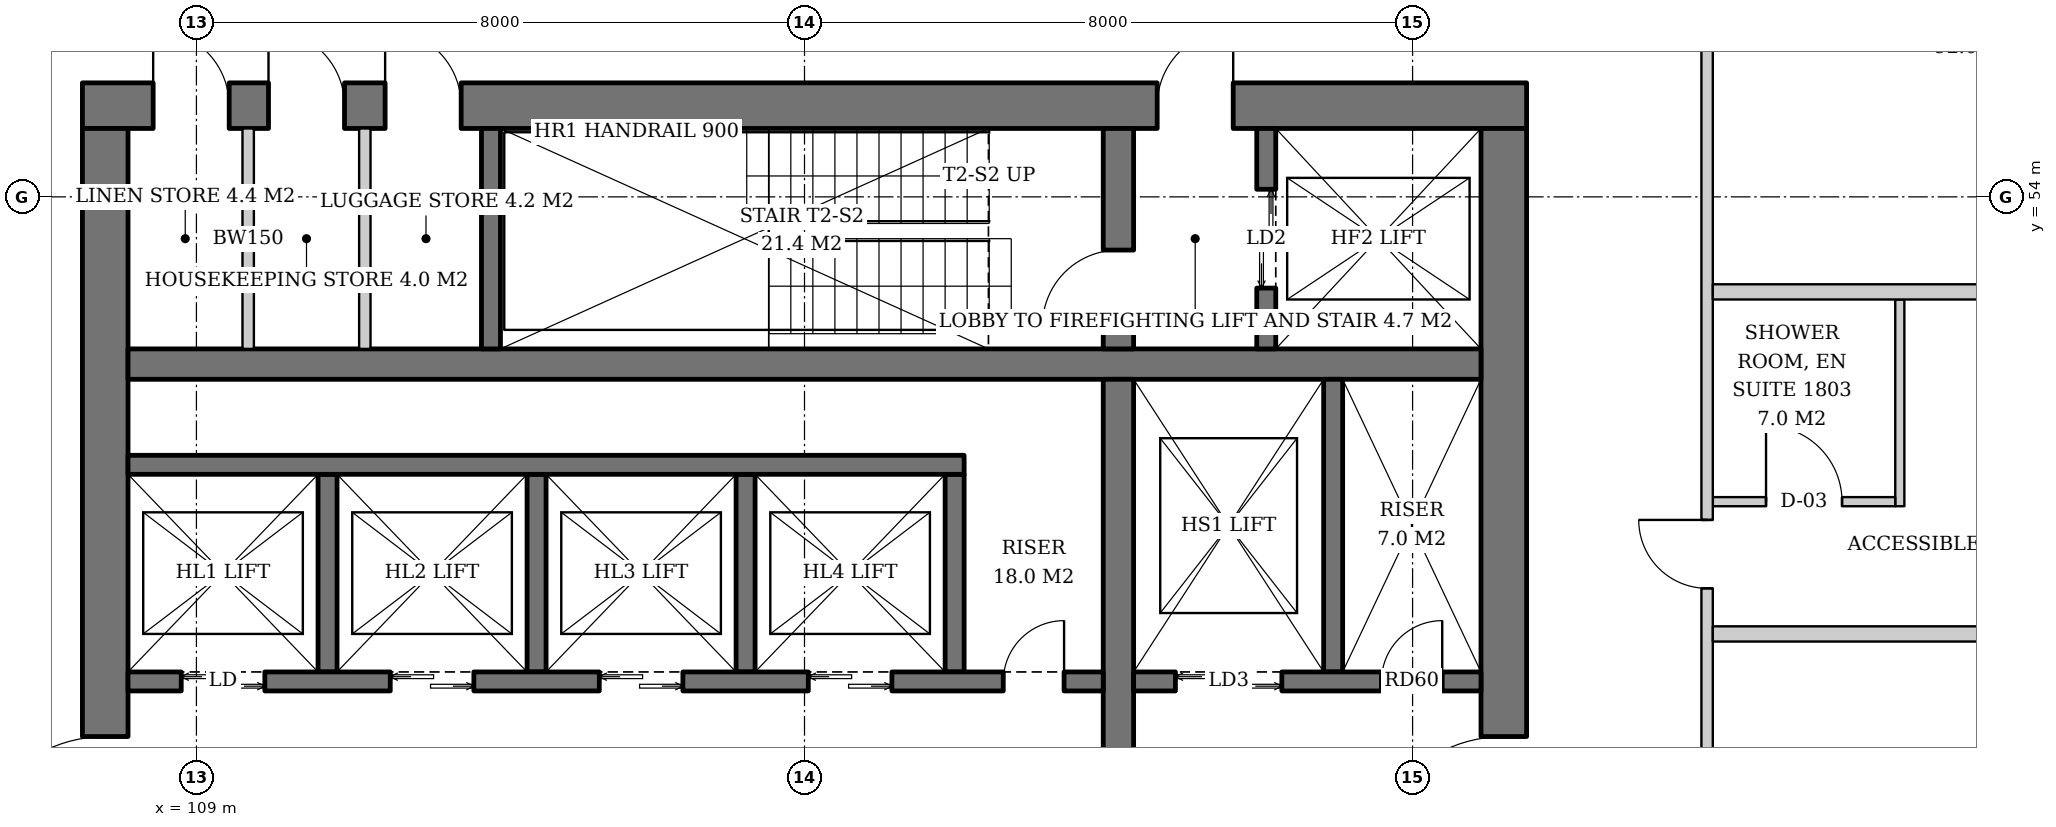
"""IFC4 building model, lengths in metres.
Left out: names, types, materials, properties, quantities, classifications, styles, units other than length and angle.
Written with IfcOpenShell. Run it as: python <this file> out.ifc"""

import sys

from ifc_helpers import new_model, si_unit, direction, frame, frame_2d, origin, place, context, subcontext, project, spatial, rectangle, extrude, element, fill, save


model = new_model("IFC4")
c1 = context("Model", 3, precision=1e-05, world=origin(), true_north=direction((0.0, 1.0)))
c2 = subcontext(c1, "Body", "Model", "MODEL_VIEW")
j1 = project(units=[si_unit("LENGTHUNIT", "METRE"), si_unit("PLANEANGLEUNIT", "RADIAN")], contexts=[c1])
p1 = place(None, origin())
s1 = spatial("IfcSite", under=j1, at=p1, CompositionType="ELEMENT")
p2 = place(p1, origin())
s2 = spatial("IfcBuilding", under=s1, at=p2, CompositionType="ELEMENT")
p3 = place(p2, frame((0.0, 0.0, 74.2)))
s3 = spatial("IfcBuildingStorey", under=s2, at=p3, CompositionType="ELEMENT", Elevation=74.2)
p4 = place(p3, frame((107.5, 55.2, 0.0), z_axis=(0.0, 0.0, 1.0), x_axis=(1.0, 0.0, 0.0)))
e1 = element("IfcWall", 1, at=p4, inside=s3, PredefinedType="SHEAR", context=c2, shape_type="SweptSolid", body=[
    extrude(rectangle(XDim=19.0, YDim=0.6, at=frame_2d((9.5, 0.0))), origin(), (0.0, 0.0, 1.0), 3.8),
])
p5 = place(p4, frame((14.14, 0.0, 0.0)))
e2 = element("IfcOpeningElement", 2, at=p5, cuts=e1, PredefinedType="OPENING", context=c2, shape_type="SweptSolid", body=[
    extrude(rectangle(XDim=1.0, YDim=2.1, at=frame_2d((0.5, 1.05))), frame((0.0, 0.31, 0.0), z_axis=(0.0, -1.0, 0.0), x_axis=(1.0, 0.0, 0.0)), (0.0, 0.0, 1.0), 0.62),
])
p6 = place(p4, frame((0.931, 0.0, 0.0)))
e3 = element("IfcOpeningElement", 3, at=p6, cuts=e1, PredefinedType="OPENING", context=c2, shape_type="SweptSolid", body=[
    extrude(rectangle(XDim=1.0, YDim=2.1, at=frame_2d((0.5, 1.05))), frame((0.0, 0.31, 0.0), z_axis=(0.0, -1.0, 0.0), x_axis=(1.0, 0.0, 0.0)), (0.0, 0.0, 1.0), 0.62),
])
p7 = place(p4, frame((2.448, 0.0, 0.0)))
e4 = element("IfcOpeningElement", 4, at=p7, cuts=e1, PredefinedType="OPENING", context=c2, shape_type="SweptSolid", body=[
    extrude(rectangle(XDim=1.0, YDim=2.1, at=frame_2d((0.5, 1.05))), frame((0.0, 0.31, 0.0), z_axis=(0.0, -1.0, 0.0), x_axis=(1.0, 0.0, 0.0)), (0.0, 0.0, 1.0), 0.62),
])
p8 = place(p4, frame((3.983, 0.0, 0.0)))
e5 = element("IfcOpeningElement", 5, at=p8, cuts=e1, PredefinedType="OPENING", context=c2, shape_type="SweptSolid", body=[
    extrude(rectangle(XDim=1.0, YDim=2.1, at=frame_2d((0.5, 1.05))), frame((0.0, 0.31, 0.0), z_axis=(0.0, -1.0, 0.0), x_axis=(1.0, 0.0, 0.0)), (0.0, 0.0, 1.0), 0.62),
])
p9 = place(p3, frame((107.8, 37.1, 0.0), z_axis=(0.0, 0.0, 1.0), x_axis=(0.0, 1.0, 0.0)))
e6 = element("IfcWall", 6, at=p9, inside=s3, PredefinedType="SHEAR", context=c2, shape_type="SweptSolid", body=[
    extrude(rectangle(XDim=17.8, YDim=0.6, at=frame_2d((8.9, 0.0))), origin(), (0.0, 0.0, 1.0), 3.8),
])
p10 = place(p9, frame((8.0, 0.0, 0.0)))
e7 = element("IfcOpeningElement", 7, at=p10, cuts=e6, PredefinedType="OPENING", context=c2, shape_type="SweptSolid", body=[
    extrude(rectangle(XDim=1.8, YDim=2.4, at=frame_2d((0.9, 1.2))), frame((0.0, 0.31, 0.0), z_axis=(0.0, -1.0, 0.0), x_axis=(1.0, 0.0, 0.0)), (0.0, 0.0, 1.0), 0.62),
])
p11 = place(p3, frame((126.2, 37.1, 0.0), z_axis=(0.0, 0.0, 1.0), x_axis=(0.0, 1.0, 0.0)))
e8 = element("IfcWall", 8, at=p11, inside=s3, PredefinedType="SHEAR", context=c2, shape_type="SweptSolid", body=[
    extrude(rectangle(XDim=17.8, YDim=0.6, at=frame_2d((8.9, 0.0))), origin(), (0.0, 0.0, 1.0), 3.8),
])
p12 = place(p11, frame((8.0, 0.0, 0.0)))
e9 = element("IfcOpeningElement", 9, at=p12, cuts=e8, PredefinedType="OPENING", context=c2, shape_type="SweptSolid", body=[
    extrude(rectangle(XDim=1.8, YDim=2.4, at=frame_2d((0.9, 1.2))), frame((0.0, 0.31, 0.0), z_axis=(0.0, -1.0, 0.0), x_axis=(1.0, 0.0, 0.0)), (0.0, 0.0, 1.0), 0.62),
])
p13 = place(p3, frame((108.1, 51.8, 0.0), z_axis=(0.0, 0.0, 1.0), x_axis=(1.0, 0.0, 0.0)))
e10 = element("IfcWall", 10, at=p13, inside=s3, PredefinedType="SHEAR", context=c2, shape_type="SweptSolid", body=[
    extrude(rectangle(XDim=17.8, YDim=0.4, at=frame_2d((8.9, 0.0))), origin(), (0.0, 0.0, 1.0), 3.8),
])
p14 = place(p3, frame((121.13, 40.4, 0.0), z_axis=(0.0, 0.0, 1.0), x_axis=(0.0, 1.0, 0.0)))
e11 = element("IfcWall", 11, at=p14, inside=s3, PredefinedType="SHEAR", context=c2, shape_type="SweptSolid", body=[
    extrude(rectangle(XDim=11.2, YDim=0.4, at=frame_2d((5.6, 0.0))), origin(), (0.0, 0.0, 1.0), 3.8),
])
p15 = place(p3, frame((121.13, 52.0, 0.0), z_axis=(0.0, 0.0, 1.0), x_axis=(0.0, 1.0, 0.0)))
e12 = element("IfcWall", 12, at=p15, inside=s3, PredefinedType="SHEAR", context=c2, shape_type="SweptSolid", body=[
    extrude(rectangle(XDim=2.9, YDim=0.4, at=frame_2d((1.45, 0.0))), origin(), (0.0, 0.0, 1.0), 3.8),
])
p16 = place(p15, frame((0.3, 0.0, 0.0)))
e13 = element("IfcOpeningElement", 13, at=p16, cuts=e12, PredefinedType="OPENING", context=c2, shape_type="SweptSolid", body=[
    extrude(rectangle(XDim=1.0, YDim=2.1, at=frame_2d((0.5, 1.05))), frame((0.0, 0.21, 0.0), z_axis=(0.0, -1.0, 0.0), x_axis=(1.0, 0.0, 0.0)), (0.0, 0.0, 1.0), 0.42),
])
p17 = place(p3, frame((112.875, 52.0, 0.0), z_axis=(0.0, 0.0, 1.0), x_axis=(0.0, 1.0, 0.0)))
e14 = element("IfcWall", 14, at=p17, inside=s3, PredefinedType="SHEAR", context=c2, shape_type="SweptSolid", body=[
    extrude(rectangle(XDim=2.9, YDim=0.25, at=frame_2d((1.45, 0.0))), origin(), (0.0, 0.0, 1.0), 3.8),
])
p18 = place(p3, frame((123.075, 52.0, 0.0), z_axis=(0.0, 0.0, 1.0), x_axis=(0.0, 1.0, 0.0)))
e15 = element("IfcWall", 15, at=p18, inside=s3, PredefinedType="SHEAR", context=c2, shape_type="SweptSolid", body=[
    extrude(rectangle(XDim=2.9, YDim=0.25, at=frame_2d((1.45, 0.0))), origin(), (0.0, 0.0, 1.0), 3.8),
])
p19 = place(p18, frame((0.8, 0.0, 0.0)))
e16 = element("IfcOpeningElement", 16, at=p19, cuts=e15, PredefinedType="OPENING", context=c2, shape_type="SweptSolid", body=[
    extrude(rectangle(XDim=1.3, YDim=2.2, at=frame_2d((0.65, 1.1))), frame((0.0, 0.135, 0.0), z_axis=(0.0, -1.0, 0.0), x_axis=(1.0, 0.0, 0.0)), (0.0, 0.0, 1.0), 0.27),
])
for number, where, z_axis, x_axis in (
    (17, (110.725, 47.75, 0.0), (0.0, 0.0, 1.0), (0.0, 1.0, 0.0)),
    (18, (113.475, 47.75, 0.0), (0.0, 0.0, 1.0), (0.0, 1.0, 0.0)),
    (19, (116.225, 47.75, 0.0), (0.0, 0.0, 1.0), (0.0, 1.0, 0.0)),
    (20, (118.975, 47.75, 0.0), (0.0, 0.0, 1.0), (0.0, 1.0, 0.0)),
):
    element("IfcWall", number, at=place(p3, frame(where, z_axis=z_axis, x_axis=x_axis)), inside=s3, PredefinedType="SHEAR", context=c2, shape_type="SweptSolid", body=[
        extrude(rectangle(XDim=2.6, YDim=0.25, at=frame_2d((1.3, 0.0))), origin(), (0.0, 0.0, 1.0), 3.8),
    ])
p20 = place(p3, frame((108.1, 50.475, 0.0), z_axis=(0.0, 0.0, 1.0), x_axis=(1.0, 0.0, 0.0)))
e21 = element("IfcWall", 21, at=p20, inside=s3, PredefinedType="SHEAR", context=c2, shape_type="SweptSolid", body=[
    extrude(rectangle(XDim=11.0, YDim=0.25, at=frame_2d((5.5, 0.0))), origin(), (0.0, 0.0, 1.0), 3.8),
])
p21 = place(p3, frame((108.1, 47.625, 0.0), z_axis=(0.0, 0.0, 1.0), x_axis=(1.0, 0.0, 0.0)))
e22 = element("IfcWall", 22, at=p21, inside=s3, PredefinedType="SHEAR", context=c2, shape_type="SweptSolid", body=[
    extrude(rectangle(XDim=12.83, YDim=0.25, at=frame_2d((6.415, 0.0))), origin(), (0.0, 0.0, 1.0), 3.8),
])
p22 = place(p21, frame((0.7, 0.0, 0.0)))
e23 = element("IfcOpeningElement", 23, at=p22, cuts=e22, PredefinedType="OPENING", context=c2, shape_type="SweptSolid", body=[
    extrude(rectangle(XDim=1.1, YDim=2.2, at=frame_2d((0.55, 1.1))), frame((0.0, 0.135, 0.0), z_axis=(0.0, -1.0, 0.0), x_axis=(1.0, 0.0, 0.0)), (0.0, 0.0, 1.0), 0.27),
])
p23 = place(p21, frame((3.45, 0.0, 0.0)))
e24 = element("IfcOpeningElement", 24, at=p23, cuts=e22, PredefinedType="OPENING", context=c2, shape_type="SweptSolid", body=[
    extrude(rectangle(XDim=1.1, YDim=2.2, at=frame_2d((0.55, 1.1))), frame((0.0, 0.135, 0.0), z_axis=(0.0, -1.0, 0.0), x_axis=(1.0, 0.0, 0.0)), (0.0, 0.0, 1.0), 0.27),
])
p24 = place(p21, frame((6.2, 0.0, 0.0)))
e25 = element("IfcOpeningElement", 25, at=p24, cuts=e22, PredefinedType="OPENING", context=c2, shape_type="SweptSolid", body=[
    extrude(rectangle(XDim=1.1, YDim=2.2, at=frame_2d((0.55, 1.1))), frame((0.0, 0.135, 0.0), z_axis=(0.0, -1.0, 0.0), x_axis=(1.0, 0.0, 0.0)), (0.0, 0.0, 1.0), 0.27),
])
p25 = place(p21, frame((8.95, 0.0, 0.0)))
e26 = element("IfcOpeningElement", 26, at=p25, cuts=e22, PredefinedType="OPENING", context=c2, shape_type="SweptSolid", body=[
    extrude(rectangle(XDim=1.1, YDim=2.2, at=frame_2d((0.55, 1.1))), frame((0.0, 0.135, 0.0), z_axis=(0.0, -1.0, 0.0), x_axis=(1.0, 0.0, 0.0)), (0.0, 0.0, 1.0), 0.27),
])
p26 = place(p21, frame((11.515, 0.0, 0.0)))
e27 = element("IfcOpeningElement", 27, at=p26, cuts=e22, PredefinedType="OPENING", context=c2, shape_type="SweptSolid", body=[
    extrude(rectangle(XDim=0.8, YDim=2.0, at=frame_2d((0.4, 1.0))), frame((0.0, 0.135, 0.0), z_axis=(0.0, -1.0, 0.0), x_axis=(1.0, 0.0, 0.0)), (0.0, 0.0, 1.0), 0.27),
])
p27 = place(p3, frame((123.955, 47.75, 0.0), z_axis=(0.0, 0.0, 1.0), x_axis=(0.0, 1.0, 0.0)))
e28 = element("IfcWall", 28, at=p27, inside=s3, PredefinedType="SHEAR", context=c2, shape_type="SweptSolid", body=[
    extrude(rectangle(XDim=3.85, YDim=0.25, at=frame_2d((1.925, 0.0))), origin(), (0.0, 0.0, 1.0), 3.8),
])
p28 = place(p3, frame((121.33, 47.625, 0.0), z_axis=(0.0, 0.0, 1.0), x_axis=(1.0, 0.0, 0.0)))
e29 = element("IfcWall", 29, at=p28, inside=s3, PredefinedType="SHEAR", context=c2, shape_type="SweptSolid", body=[
    extrude(rectangle(XDim=4.57, YDim=0.25, at=frame_2d((2.285, 0.0))), origin(), (0.0, 0.0, 1.0), 3.8),
])
p29 = place(p28, frame((0.55, 0.0, 0.0)))
e30 = element("IfcOpeningElement", 30, at=p29, cuts=e29, PredefinedType="OPENING", context=c2, shape_type="SweptSolid", body=[
    extrude(rectangle(XDim=1.4, YDim=2.4, at=frame_2d((0.7, 1.2))), frame((0.0, 0.135, 0.0), z_axis=(0.0, -1.0, 0.0), x_axis=(1.0, 0.0, 0.0)), (0.0, 0.0, 1.0), 0.27),
])
p30 = place(p28, frame((3.26, 0.0, 0.0)))
e31 = element("IfcOpeningElement", 31, at=p30, cuts=e29, PredefinedType="OPENING", context=c2, shape_type="SweptSolid", body=[
    extrude(rectangle(XDim=0.8, YDim=2.0, at=frame_2d((0.4, 1.0))), frame((0.0, 0.135, 0.0), z_axis=(0.0, -1.0, 0.0), x_axis=(1.0, 0.0, 0.0)), (0.0, 0.0, 1.0), 0.27),
])
for number, where, z_axis, x_axis in (
    (32, (109.681, 52.0, 0.0), (0.0, 0.0, 1.0), (0.0, 1.0, 0.0)),
    (33, (111.216, 52.0, 0.0), (0.0, 0.0, 1.0), (0.0, 1.0, 0.0)),
):
    element("IfcWall", number, at=place(p3, frame(where, z_axis=z_axis, x_axis=x_axis)), inside=s3, PredefinedType="SOLIDWALL", context=c2, shape_type="SweptSolid", body=[
        extrude(rectangle(XDim=2.9, YDim=0.15, at=frame_2d((1.45, 0.0))), origin(), (0.0, 0.0, 1.0), 3.6),
    ])
p31 = place(p3, frame((131.41, 49.93, 0.0), z_axis=(0.0, 0.0, 1.0), x_axis=(0.0, 1.0, 0.0)))
e34 = element("IfcWall", 34, at=p31, inside=s3, PredefinedType="PARTITIONING", context=c2, shape_type="SweptSolid", body=[
    extrude(rectangle(XDim=2.72, YDim=0.12, at=frame_2d((1.36, 0.0))), origin(), (0.0, 0.0, 1.0), 3.6),
])
p32 = place(p3, frame((128.95, 49.99, 0.0), z_axis=(0.0, 0.0, 1.0), x_axis=(1.0, 0.0, 0.0)))
e35 = element("IfcWall", 35, at=p32, inside=s3, PredefinedType="PARTITIONING", context=c2, shape_type="SweptSolid", body=[
    extrude(rectangle(XDim=2.4, YDim=0.12, at=frame_2d((1.2, 0.0))), origin(), (0.0, 0.0, 1.0), 3.6),
])
p33 = place(p32, frame((0.7, 0.0, 0.0)))
e36 = element("IfcOpeningElement", 36, at=p33, cuts=e35, PredefinedType="OPENING", context=c2, shape_type="SweptSolid", body=[
    extrude(rectangle(XDim=1.0, YDim=2.1, at=frame_2d((0.5, 1.05))), frame((0.0, 0.07, 0.0), z_axis=(0.0, -1.0, 0.0), x_axis=(1.0, 0.0, 0.0)), (0.0, 0.0, 1.0), 0.14),
])
p34 = place(p3, frame((128.875, 34.05, 0.0), z_axis=(0.0, 0.0, 1.0), x_axis=(0.0, 1.0, 0.0)))
e37 = element("IfcWall", 37, at=p34, inside=s3, PredefinedType="PARTITIONING", context=c2, shape_type="SweptSolid", body=[
    extrude(rectangle(XDim=23.75, YDim=0.15, at=frame_2d((11.875, 0.0))), origin(), (0.0, 0.0, 1.0), 2.8),
])
p35 = place(p34, frame((2.175, 0.0, 0.0)))
e38 = element("IfcOpeningElement", 38, at=p35, cuts=e37, PredefinedType="OPENING", context=c2, shape_type="SweptSolid", body=[
    extrude(rectangle(XDim=0.9, YDim=2.1, at=frame_2d((0.45, 1.05))), frame((0.0, 0.085, 0.0), z_axis=(0.0, -1.0, 0.0), x_axis=(1.0, 0.0, 0.0)), (0.0, 0.0, 1.0), 0.17),
])
p36 = place(p34, frame((7.95, 0.0, 0.0)))
e39 = element("IfcOpeningElement", 39, at=p36, cuts=e37, PredefinedType="OPENING", context=c2, shape_type="SweptSolid", body=[
    extrude(rectangle(XDim=0.9, YDim=2.1, at=frame_2d((0.45, 1.05))), frame((0.0, 0.085, 0.0), z_axis=(0.0, -1.0, 0.0), x_axis=(1.0, 0.0, 0.0)), (0.0, 0.0, 1.0), 0.17),
])
p37 = place(p34, frame((14.8, 0.0, 0.0)))
e40 = element("IfcOpeningElement", 40, at=p37, cuts=e37, PredefinedType="OPENING", context=c2, shape_type="SweptSolid", body=[
    extrude(rectangle(XDim=0.9, YDim=2.1, at=frame_2d((0.45, 1.05))), frame((0.0, 0.085, 0.0), z_axis=(0.0, -1.0, 0.0), x_axis=(1.0, 0.0, 0.0)), (0.0, 0.0, 1.0), 0.17),
])
p38 = place(p3, frame((128.95, 48.25, 0.0), z_axis=(0.0, 0.0, 1.0), x_axis=(1.0, 0.0, 0.0)))
e41 = element("IfcWall", 41, at=p38, inside=s3, PredefinedType="PARTITIONING", context=c2, shape_type="SweptSolid", body=[
    extrude(rectangle(XDim=6.84, YDim=0.2, at=frame_2d((3.42, 0.0))), origin(), (0.0, 0.0, 1.0), 3.05),
])
p39 = place(p3, frame((128.95, 52.75, 0.0), z_axis=(0.0, 0.0, 1.0), x_axis=(1.0, 0.0, 0.0)))
e42 = element("IfcWall", 42, at=p39, inside=s3, PredefinedType="PARTITIONING", context=c2, shape_type="SweptSolid", body=[
    extrude(rectangle(XDim=4.187, YDim=0.2, at=frame_2d((2.093, 0.0))), origin(), (0.0, 0.0, 1.0), 3.6),
])
p40 = place(p19, origin())
e43 = element("IfcDoor", 43, at=p40, inside=s3, OperationType="DOUBLE_DOOR_SLIDING", PredefinedType="DOOR", context=c2, shape_type="SweptSolid", body=[
    extrude(rectangle(XDim=1.3, YDim=2.2, at=frame_2d((0.65, 1.1))), frame((0.0, 0.025, 0.0), z_axis=(0.0, -1.0, 0.0), x_axis=(1.0, 0.0, 0.0)), (0.0, 0.0, 1.0), 0.05),
])
fill(e16, e43)
p41 = place(p22, origin())
e44 = element("IfcDoor", 44, at=p41, inside=s3, OperationType="DOUBLE_DOOR_SLIDING", PredefinedType="DOOR", context=c2, shape_type="SweptSolid", body=[
    extrude(rectangle(XDim=1.1, YDim=2.2, at=frame_2d((0.55, 1.1))), frame((0.0, 0.025, 0.0), z_axis=(0.0, -1.0, 0.0), x_axis=(1.0, 0.0, 0.0)), (0.0, 0.0, 1.0), 0.05),
])
fill(e23, e44)
p42 = place(p23, origin())
e45 = element("IfcDoor", 45, at=p42, inside=s3, OperationType="DOUBLE_DOOR_SLIDING", PredefinedType="DOOR", context=c2, shape_type="SweptSolid", body=[
    extrude(rectangle(XDim=1.1, YDim=2.2, at=frame_2d((0.55, 1.1))), frame((0.0, 0.025, 0.0), z_axis=(0.0, -1.0, 0.0), x_axis=(1.0, 0.0, 0.0)), (0.0, 0.0, 1.0), 0.05),
])
fill(e24, e45)
p43 = place(p24, origin())
e46 = element("IfcDoor", 46, at=p43, inside=s3, OperationType="DOUBLE_DOOR_SLIDING", PredefinedType="DOOR", context=c2, shape_type="SweptSolid", body=[
    extrude(rectangle(XDim=1.1, YDim=2.2, at=frame_2d((0.55, 1.1))), frame((0.0, 0.025, 0.0), z_axis=(0.0, -1.0, 0.0), x_axis=(1.0, 0.0, 0.0)), (0.0, 0.0, 1.0), 0.05),
])
fill(e25, e46)
p44 = place(p25, origin())
e47 = element("IfcDoor", 47, at=p44, inside=s3, OperationType="DOUBLE_DOOR_SLIDING", PredefinedType="DOOR", context=c2, shape_type="SweptSolid", body=[
    extrude(rectangle(XDim=1.1, YDim=2.2, at=frame_2d((0.55, 1.1))), frame((0.0, 0.025, 0.0), z_axis=(0.0, -1.0, 0.0), x_axis=(1.0, 0.0, 0.0)), (0.0, 0.0, 1.0), 0.05),
])
fill(e26, e47)
p45 = place(p26, origin())
e48 = element("IfcDoor", 48, at=p45, inside=s3, OperationType="SINGLE_SWING_RIGHT", PredefinedType="DOOR", context=c2, shape_type="SweptSolid", body=[
    extrude(rectangle(XDim=0.8, YDim=2.0, at=frame_2d((0.4, 1.0))), frame((0.0, 0.025, 0.0), z_axis=(0.0, -1.0, 0.0), x_axis=(1.0, 0.0, 0.0)), (0.0, 0.0, 1.0), 0.05),
])
fill(e27, e48)
p46 = place(p29, origin())
e49 = element("IfcDoor", 49, at=p46, inside=s3, OperationType="DOUBLE_DOOR_SLIDING", PredefinedType="DOOR", context=c2, shape_type="SweptSolid", body=[
    extrude(rectangle(XDim=1.4, YDim=2.4, at=frame_2d((0.7, 1.2))), frame((0.0, 0.025, 0.0), z_axis=(0.0, -1.0, 0.0), x_axis=(1.0, 0.0, 0.0)), (0.0, 0.0, 1.0), 0.05),
])
fill(e30, e49)
p47 = place(p30, origin())
e50 = element("IfcDoor", 50, at=p47, inside=s3, OperationType="SINGLE_SWING_RIGHT", PredefinedType="DOOR", context=c2, shape_type="SweptSolid", body=[
    extrude(rectangle(XDim=0.8, YDim=2.0, at=frame_2d((0.4, 1.0))), frame((0.0, 0.025, 0.0), z_axis=(0.0, -1.0, 0.0), x_axis=(1.0, 0.0, 0.0)), (0.0, 0.0, 1.0), 0.05),
])
fill(e31, e50)
p48 = place(p16, origin())
e51 = element("IfcDoor", 51, at=p48, inside=s3, OperationType="SINGLE_SWING_LEFT", PredefinedType="DOOR", context=c2, shape_type="SweptSolid", body=[
    extrude(rectangle(XDim=1.0, YDim=2.1, at=frame_2d((0.5, 1.05))), frame((0.0, 0.025, 0.0), z_axis=(0.0, -1.0, 0.0), x_axis=(1.0, 0.0, 0.0)), (0.0, 0.0, 1.0), 0.05),
])
fill(e13, e51)
p49 = place(p5, origin())
e52 = element("IfcDoor", 52, at=p49, inside=s3, OperationType="SINGLE_SWING_RIGHT", PredefinedType="DOOR", context=c2, shape_type="SweptSolid", body=[
    extrude(rectangle(XDim=1.0, YDim=2.1, at=frame_2d((0.5, 1.05))), frame((0.0, 0.025, 0.0), z_axis=(0.0, -1.0, 0.0), x_axis=(1.0, 0.0, 0.0)), (0.0, 0.0, 1.0), 0.05),
])
fill(e2, e52)
p50 = place(p10, origin())
e53 = element("IfcDoor", 53, at=p50, inside=s3, OperationType="DOUBLE_DOOR_SINGLE_SWING", PredefinedType="DOOR", context=c2, shape_type="SweptSolid", body=[
    extrude(rectangle(XDim=1.8, YDim=2.4, at=frame_2d((0.9, 1.2))), frame((0.0, 0.025, 0.0), z_axis=(0.0, -1.0, 0.0), x_axis=(1.0, 0.0, 0.0)), (0.0, 0.0, 1.0), 0.05),
])
fill(e7, e53)
p51 = place(p12, origin())
e54 = element("IfcDoor", 54, at=p51, inside=s3, OperationType="DOUBLE_DOOR_SINGLE_SWING", PredefinedType="DOOR", context=c2, shape_type="SweptSolid", body=[
    extrude(rectangle(XDim=1.8, YDim=2.4, at=frame_2d((0.9, 1.2))), frame((0.0, 0.025, 0.0), z_axis=(0.0, -1.0, 0.0), x_axis=(1.0, 0.0, 0.0)), (0.0, 0.0, 1.0), 0.05),
])
fill(e9, e54)
p52 = place(p6, origin())
e55 = element("IfcDoor", 55, at=p52, inside=s3, OperationType="SINGLE_SWING_LEFT", PredefinedType="DOOR", context=c2, shape_type="SweptSolid", body=[
    extrude(rectangle(XDim=1.0, YDim=2.1, at=frame_2d((0.5, 1.05))), frame((0.0, -0.24, 0.0), z_axis=(0.0, -1.0, 0.0), x_axis=(1.0, 0.0, 0.0)), (0.0, 0.0, 1.0), 0.05),
])
fill(e3, e55)
p53 = place(p7, origin())
e56 = element("IfcDoor", 56, at=p53, inside=s3, OperationType="SINGLE_SWING_LEFT", PredefinedType="DOOR", context=c2, shape_type="SweptSolid", body=[
    extrude(rectangle(XDim=1.0, YDim=2.1, at=frame_2d((0.5, 1.05))), frame((0.0, -0.24, 0.0), z_axis=(0.0, -1.0, 0.0), x_axis=(1.0, 0.0, 0.0)), (0.0, 0.0, 1.0), 0.05),
])
fill(e4, e56)
p54 = place(p8, origin())
e57 = element("IfcDoor", 57, at=p54, inside=s3, OperationType="SINGLE_SWING_LEFT", PredefinedType="DOOR", context=c2, shape_type="SweptSolid", body=[
    extrude(rectangle(XDim=1.0, YDim=2.1, at=frame_2d((0.5, 1.05))), frame((0.0, -0.24, 0.0), z_axis=(0.0, -1.0, 0.0), x_axis=(1.0, 0.0, 0.0)), (0.0, 0.0, 1.0), 0.05),
])
fill(e5, e57)
p55 = place(p33, origin())
e58 = element("IfcDoor", 58, at=p55, inside=s3, OperationType="SINGLE_SWING_LEFT", PredefinedType="DOOR", context=c2, shape_type="SweptSolid", body=[
    extrude(rectangle(XDim=1.0, YDim=2.1, at=frame_2d((0.5, 1.05))), frame((0.0, 0.025, 0.0), z_axis=(0.0, -1.0, 0.0), x_axis=(1.0, 0.0, 0.0)), (0.0, 0.0, 1.0), 0.05),
])
fill(e36, e58)
p56 = place(p37, origin())
e59 = element("IfcDoor", 59, at=p56, inside=s3, OperationType="SINGLE_SWING_RIGHT", PredefinedType="DOOR", context=c2, shape_type="SweptSolid", body=[
    extrude(rectangle(XDim=0.9, YDim=2.1, at=frame_2d((0.45, 1.05))), frame((0.0, 0.025, 0.0), z_axis=(0.0, -1.0, 0.0), x_axis=(1.0, 0.0, 0.0)), (0.0, 0.0, 1.0), 0.05),
])
fill(e40, e59)
save(model, sys.argv[1])
